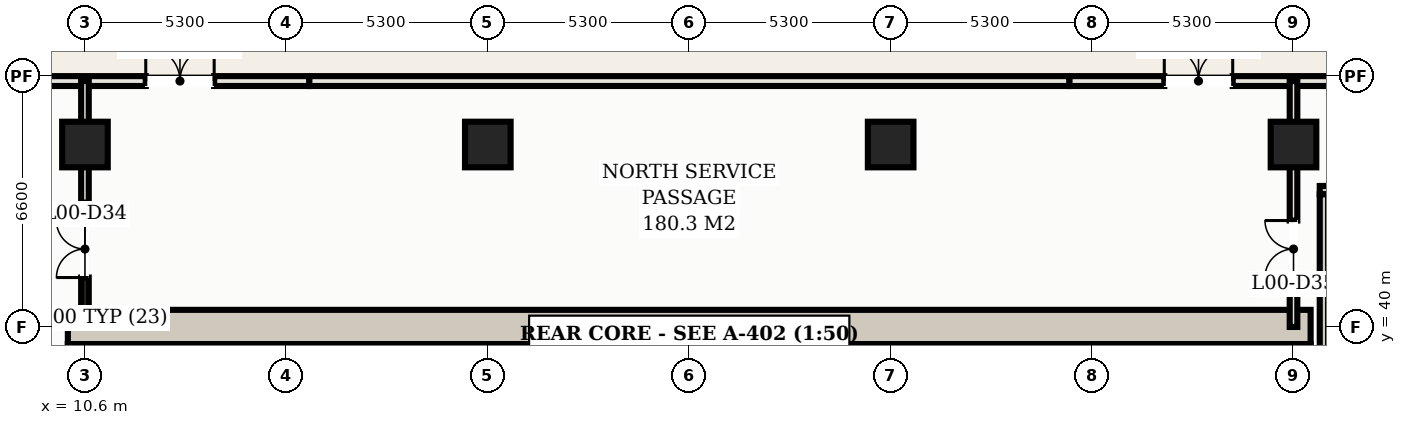
"""IFC4 building model, lengths in metres.
Left out: names, types, materials, properties, quantities, classifications, styles, units other than length and angle.
Written with IfcOpenShell. Run it as: python <this file> out.ifc"""

import sys

from ifc_helpers import new_model, si_unit, direction, frame, frame_2d, origin, origin_2d, place, context, subcontext, project, spatial, rectangle, hollow_rectangle, extrude, element, fill, save


model = new_model("IFC4")
c1 = context("Model", 3, precision=1e-05, world=origin(), true_north=direction((0.0, 1.0)))
c2 = subcontext(c1, "Body", "Model", "MODEL_VIEW")
j1 = project(units=[si_unit("LENGTHUNIT", "METRE"), si_unit("PLANEANGLEUNIT", "RADIAN")], contexts=[c1])
p1 = place(None, origin())
s1 = spatial("IfcSite", under=j1, at=p1, CompositionType="ELEMENT")
p2 = place(p1, origin())
s2 = spatial("IfcBuilding", under=s1, at=p2, CompositionType="ELEMENT")
p3 = place(p2, origin())
s3 = spatial("IfcBuildingStorey", under=s2, at=p3, CompositionType="ELEMENT", Elevation=0.0)
p4 = place(p3, frame((10.15, 40.0, 0.0), z_axis=(0.0, 0.0, 1.0), x_axis=(1.0, 0.0, 0.0)))
e1 = element("IfcWall", 1, at=p4, inside=s3, PredefinedType="SHEAR", context=c2, shape_type="SweptSolid", body=[
    extrude(rectangle(XDim=32.7, YDim=0.9, at=frame_2d((16.35, 0.0))), origin(), (0.0, 0.0, 1.0), 4.95),
])
for number, where, z_axis, x_axis in (
    (2, (10.6, 25.65, 0.0), (0.0, 0.0, 1.0), (0.0, 1.0, 0.0)),
    (3, (42.4, 25.65, 0.0), (0.0, 0.0, 1.0), (0.0, 1.0, 0.0)),
):
    element("IfcWall", number, at=place(p3, frame(where, z_axis=z_axis, x_axis=x_axis)), inside=s3, PredefinedType="SHEAR", context=c2, shape_type="SweptSolid", body=[
        extrude(rectangle(XDim=13.9, YDim=0.9, at=frame_2d((6.95, 0.0))), origin(), (0.0, 0.0, 1.0), 4.95),
    ])
p5 = place(p3, frame((15.1, 31.1, 0.0), z_axis=(0.0, 0.0, 1.0), x_axis=(0.0, 1.0, 0.0)))
e4 = element("IfcWall", 4, at=p5, inside=s3, PredefinedType="SHEAR", context=c2, shape_type="SweptSolid", body=[
    extrude(rectangle(XDim=8.45, YDim=0.5, at=frame_2d((4.225, 0.0))), origin(), (0.0, 0.0, 1.0), 4.95),
])
p6 = place(p5, frame((0.51, 0.0, 0.0)))
e5 = element("IfcOpeningElement", 5, at=p6, cuts=e4, PredefinedType="OPENING", context=c2, shape_type="SweptSolid", body=[
    extrude(rectangle(XDim=1.15, YDim=2.2, at=frame_2d((0.575, 1.1))), frame((0.0, 0.26, 0.0), z_axis=(0.0, -1.0, 0.0), x_axis=(1.0, 0.0, 0.0)), (0.0, 0.0, 1.0), 0.52),
])
p7 = place(p3, frame((37.9, 31.1, 0.0), z_axis=(0.0, 0.0, 1.0), x_axis=(0.0, 1.0, 0.0)))
e6 = element("IfcWall", 6, at=p7, inside=s3, PredefinedType="SHEAR", context=c2, shape_type="SweptSolid", body=[
    extrude(rectangle(XDim=8.45, YDim=0.5, at=frame_2d((4.225, 0.0))), origin(), (0.0, 0.0, 1.0), 4.95),
])
p8 = place(p7, frame((0.51, 0.0, 0.0)))
e7 = element("IfcOpeningElement", 7, at=p8, cuts=e6, PredefinedType="OPENING", context=c2, shape_type="SweptSolid", body=[
    extrude(rectangle(XDim=1.15, YDim=2.2, at=frame_2d((0.575, 1.1))), frame((0.0, 0.26, 0.0), z_axis=(0.0, -1.0, 0.0), x_axis=(1.0, 0.0, 0.0)), (0.0, 0.0, 1.0), 0.52),
])
for number, where, z_axis, x_axis in (
    (8, (10.6, 44.8, 0.0), (0.0, 0.0, 1.0), (1.0, 0.0, 0.0)),
    (9, (21.2, 44.8, 0.0), (0.0, 0.0, 1.0), (1.0, 0.0, 0.0)),
    (10, (31.8, 44.8, 0.0), (0.0, 0.0, 1.0), (1.0, 0.0, 0.0)),
    (11, (42.4, 44.8, 0.0), (0.0, 0.0, 1.0), (1.0, 0.0, 0.0)),
):
    element("IfcColumn", number, at=place(p3, frame(where, z_axis=z_axis, x_axis=x_axis)), inside=s3, PredefinedType="COLUMN", context=c2, shape_type="SweptSolid", body=[
        extrude(hollow_rectangle(XDim=1.2, YDim=1.2, WallThickness=0.04, at=origin_2d()), origin(), (0.0, 0.0, 1.0), 5.2),
    ])
p9 = place(p3, frame((43.09, 43.6, 0.0), z_axis=(0.0, 0.0, 1.0), x_axis=(1.0, 0.0, 0.0)))
e12 = element("IfcWall", 12, at=p9, inside=s3, PredefinedType="SHEAR", context=c2, shape_type="SweptSolid", body=[
    extrude(rectangle(XDim=4.22, YDim=0.22, at=frame_2d((2.11, 0.0))), origin(), (0.0, 0.0, 1.0), 4.95),
])
p10 = place(p3, frame((43.2, 35.31, 0.0), z_axis=(0.0, 0.0, 1.0), x_axis=(0.0, 1.0, 0.0)))
e13 = element("IfcWall", 13, at=p10, inside=s3, PredefinedType="SHEAR", context=c2, shape_type="SweptSolid", body=[
    extrude(rectangle(XDim=8.18, YDim=0.22, at=frame_2d((4.09, 0.0))), origin(), (0.0, 0.0, 1.0), 4.95),
])
for number, where, z_axis, x_axis in (
    (14, (26.8, 39.4, 0.0), (0.0, 0.0, 1.0), (1.0, 0.0, 0.0)),
    (15, (29.2, 39.4, 0.0), (0.0, 0.0, 1.0), (1.0, 0.0, 0.0)),
):
    element("IfcWall", number, at=place(p3, frame(where, z_axis=z_axis, x_axis=x_axis)), inside=s3, PredefinedType="SOLIDWALL", context=c2, shape_type="SweptSolid", body=[
        extrude(rectangle(XDim=2.2, YDim=0.22, at=frame_2d((1.1, 0.0))), origin(), (0.0, 0.0, 1.0), 4.95),
    ])
p11 = place(p3, frame((63.6, 46.47, 0.0), z_axis=(0.0, 0.0, 1.0), x_axis=(-1.0, 0.0, 0.0)))
e16 = element("IfcWall", 16, at=p11, inside=s3, PredefinedType="SOLIDWALL", context=c2, shape_type="SweptSolid", body=[
    extrude(rectangle(XDim=27.1, YDim=0.26, at=frame_2d((13.55, 0.0))), origin(), (0.0, 0.0, 1.0), 4.95),
])
p12 = place(p11, frame((22.8, 0.0, 0.0)))
e17 = element("IfcOpeningElement", 17, at=p12, cuts=e16, PredefinedType="OPENING", context=c2, shape_type="SweptSolid", body=[
    extrude(rectangle(XDim=1.8, YDim=2.4, at=frame_2d((0.9, 1.2))), frame((0.0, 0.14, 0.0), z_axis=(0.0, -1.0, 0.0), x_axis=(1.0, 0.0, 0.0)), (0.0, 0.0, 1.0), 0.28),
])
p13 = place(p11, frame((13.8, 0.0, 0.0)))
e18 = element("IfcOpeningElement", 18, at=p13, cuts=e16, PredefinedType="OPENING", context=c2, shape_type="SweptSolid", body=[
    extrude(rectangle(XDim=1.8, YDim=2.4, at=frame_2d((0.9, 1.2))), frame((0.0, 0.14, 0.0), z_axis=(0.0, -1.0, 0.0), x_axis=(1.0, 0.0, 0.0)), (0.0, 0.0, 1.0), 0.28),
])
p14 = place(p11, frame((3.9, 0.0, 0.0)))
e19 = element("IfcOpeningElement", 19, at=p14, cuts=e16, PredefinedType="OPENING", context=c2, shape_type="SweptSolid", body=[
    extrude(rectangle(XDim=3.8, YDim=3.6, at=frame_2d((1.9, 1.8))), frame((0.0, 0.14, 0.0), z_axis=(0.0, -1.0, 0.0), x_axis=(1.0, 0.0, 0.0)), (0.0, 0.0, 1.0), 0.28),
])
p15 = place(p3, frame((36.5, 46.47, 0.0), z_axis=(0.0, 0.0, 1.0), x_axis=(-1.0, 0.0, 0.0)))
e20 = element("IfcWall", 20, at=p15, inside=s3, PredefinedType="SOLIDWALL", context=c2, shape_type="SweptSolid", body=[
    extrude(rectangle(XDim=20.0, YDim=0.26, at=frame_2d((10.0, 0.0))), origin(), (0.0, 0.0, 1.0), 4.95),
])
p16 = place(p3, frame((16.5, 46.47, 0.0), z_axis=(0.0, 0.0, 1.0), x_axis=(-1.0, 0.0, 0.0)))
e21 = element("IfcWall", 21, at=p16, inside=s3, PredefinedType="SOLIDWALL", context=c2, shape_type="SweptSolid", body=[
    extrude(rectangle(XDim=27.1, YDim=0.26, at=frame_2d((13.55, 0.0))), origin(), (0.0, 0.0, 1.0), 4.95),
])
p17 = place(p16, frame((2.5, 0.0, 0.0)))
e22 = element("IfcOpeningElement", 22, at=p17, cuts=e21, PredefinedType="OPENING", context=c2, shape_type="SweptSolid", body=[
    extrude(rectangle(XDim=1.8, YDim=2.4, at=frame_2d((0.9, 1.2))), frame((0.0, 0.14, 0.0), z_axis=(0.0, -1.0, 0.0), x_axis=(1.0, 0.0, 0.0)), (0.0, 0.0, 1.0), 0.28),
])
p18 = place(p16, frame((20.2, 0.0, 0.0)))
e23 = element("IfcOpeningElement", 23, at=p18, cuts=e21, PredefinedType="OPENING", context=c2, shape_type="SweptSolid", body=[
    extrude(rectangle(XDim=1.8, YDim=2.4, at=frame_2d((0.9, 1.2))), frame((0.0, 0.14, 0.0), z_axis=(0.0, -1.0, 0.0), x_axis=(1.0, 0.0, 0.0)), (0.0, 0.0, 1.0), 0.28),
])
p19 = place(p3, frame((10.6, 40.0, 0.0), z_axis=(0.0, 0.0, 1.0), x_axis=(0.0, 1.0, 0.0)))
e24 = element("IfcWall", 24, at=p19, inside=s3, PredefinedType="PARTITIONING", context=c2, shape_type="SweptSolid", body=[
    extrude(rectangle(XDim=6.47, YDim=0.2, at=frame_2d((3.235, 0.0))), origin(), (0.0, 0.0, 1.0), 4.95),
])
p20 = place(p19, frame((1.3, 0.0, 0.0)))
e25 = element("IfcOpeningElement", 25, at=p20, cuts=e24, PredefinedType="OPENING", context=c2, shape_type="SweptSolid", body=[
    extrude(rectangle(XDim=1.5, YDim=2.25, at=frame_2d((0.75, 1.125))), frame((0.0, 0.11, 0.0), z_axis=(0.0, -1.0, 0.0), x_axis=(1.0, 0.0, 0.0)), (0.0, 0.0, 1.0), 0.22),
])
p21 = place(p3, frame((42.4, 40.0, 0.0), z_axis=(0.0, 0.0, 1.0), x_axis=(0.0, 1.0, 0.0)))
e26 = element("IfcWall", 26, at=p21, inside=s3, PredefinedType="PARTITIONING", context=c2, shape_type="SweptSolid", body=[
    extrude(rectangle(XDim=6.47, YDim=0.2, at=frame_2d((3.235, 0.0))), origin(), (0.0, 0.0, 1.0), 4.95),
])
p22 = place(p21, frame((1.3, 0.0, 0.0)))
e27 = element("IfcOpeningElement", 27, at=p22, cuts=e26, PredefinedType="OPENING", context=c2, shape_type="SweptSolid", body=[
    extrude(rectangle(XDim=1.5, YDim=2.25, at=frame_2d((0.75, 1.125))), frame((0.0, 0.11, 0.0), z_axis=(0.0, -1.0, 0.0), x_axis=(1.0, 0.0, 0.0)), (0.0, 0.0, 1.0), 0.22),
])
p23 = place(p17, frame((1.8, 0.0, 0.0), z_axis=(0.0, 0.0, 1.0), x_axis=(-1.0, 0.0, 0.0)))
e28 = element("IfcDoor", 28, at=p23, inside=s3, OperationType="DOUBLE_DOOR_SINGLE_SWING", PredefinedType="DOOR", context=c2, shape_type="SweptSolid", body=[
    extrude(rectangle(XDim=1.8, YDim=2.4, at=frame_2d((0.9, 1.2))), frame((0.0, 0.025, 0.0), z_axis=(0.0, -1.0, 0.0), x_axis=(1.0, 0.0, 0.0)), (0.0, 0.0, 1.0), 0.05),
])
fill(e22, e28)
p24 = place(p12, frame((1.8, 0.0, 0.0), z_axis=(0.0, 0.0, 1.0), x_axis=(-1.0, 0.0, 0.0)))
e29 = element("IfcDoor", 29, at=p24, inside=s3, OperationType="DOUBLE_DOOR_SINGLE_SWING", PredefinedType="DOOR", context=c2, shape_type="SweptSolid", body=[
    extrude(rectangle(XDim=1.8, YDim=2.4, at=frame_2d((0.9, 1.2))), frame((0.0, 0.025, 0.0), z_axis=(0.0, -1.0, 0.0), x_axis=(1.0, 0.0, 0.0)), (0.0, 0.0, 1.0), 0.05),
])
fill(e17, e29)
p25 = place(p20, origin())
e30 = element("IfcDoor", 30, at=p25, inside=s3, OperationType="DOUBLE_DOOR_SINGLE_SWING", PredefinedType="DOOR", context=c2, shape_type="SweptSolid", body=[
    extrude(rectangle(XDim=1.5, YDim=2.25, at=frame_2d((0.75, 1.125))), frame((0.0, 0.025, 0.0), z_axis=(0.0, -1.0, 0.0), x_axis=(1.0, 0.0, 0.0)), (0.0, 0.0, 1.0), 0.05),
])
fill(e25, e30)
p26 = place(p22, origin())
e31 = element("IfcDoor", 31, at=p26, inside=s3, OperationType="DOUBLE_DOOR_SINGLE_SWING", PredefinedType="DOOR", context=c2, shape_type="SweptSolid", body=[
    extrude(rectangle(XDim=1.5, YDim=2.25, at=frame_2d((0.75, 1.125))), frame((0.0, 0.025, 0.0), z_axis=(0.0, -1.0, 0.0), x_axis=(1.0, 0.0, 0.0)), (0.0, 0.0, 1.0), 0.05),
])
fill(e27, e31)
save(model, sys.argv[1])
